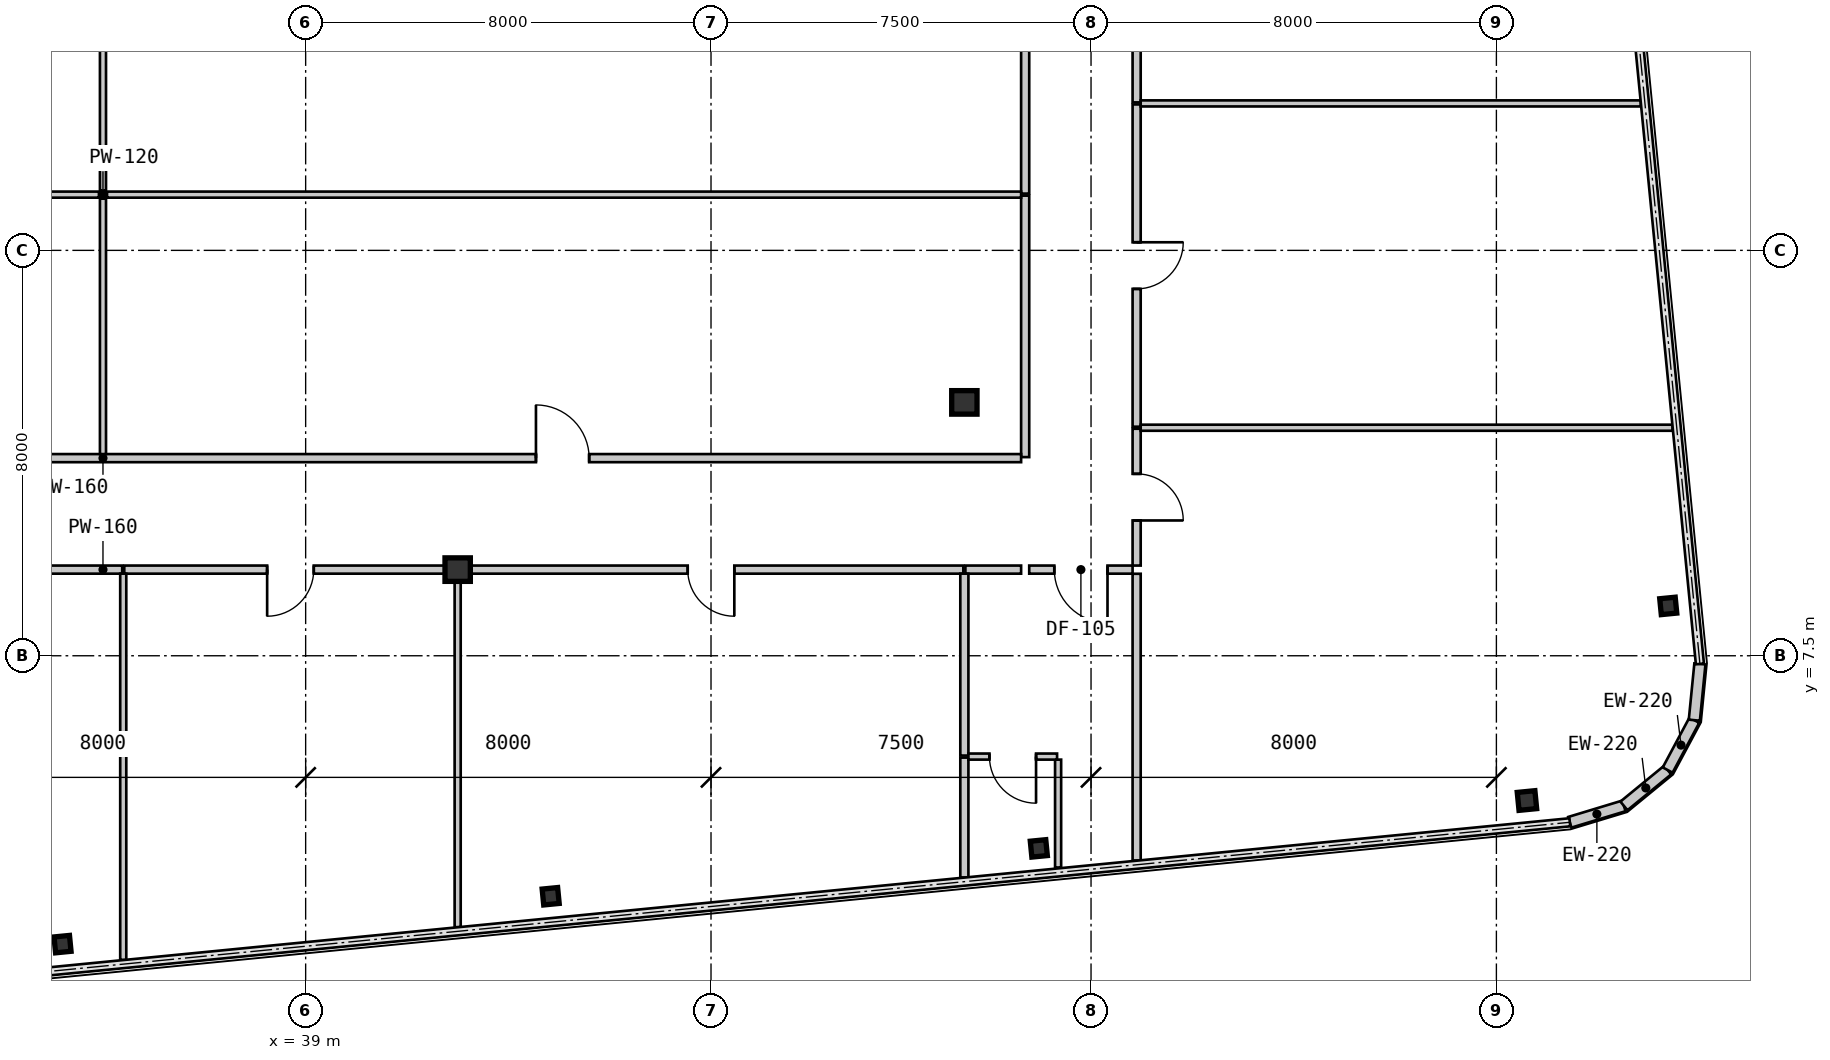
"""IFC4 building model, lengths in metres.
Left out: names, types, materials, properties, quantities, classifications, styles, units other than length and angle.
Written with IfcOpenShell. Run it as: python <this file> out.ifc"""

import sys

from ifc_helpers import new_model, si_unit, direction, frame, frame_2d, origin, origin_2d, place, context, subcontext, project, spatial, rectangle, i_section, extrude, source, transform, mapped, element, fill, save


model = new_model("IFC4")
c1 = context("Model", 3, precision=1e-05, world=origin(), true_north=direction((0.0, 1.0)))
c2 = subcontext(c1, "Body", "Model", "MODEL_VIEW")
j1 = project(units=[si_unit("LENGTHUNIT", "METRE"), si_unit("PLANEANGLEUNIT", "RADIAN")], contexts=[c1])
p1 = place(None, origin())
s1 = spatial("IfcSite", under=j1, at=p1, CompositionType="ELEMENT")
p2 = place(p1, origin())
s2 = spatial("IfcBuilding", under=s1, at=p2, CompositionType="ELEMENT")
p3 = place(p2, frame((0.0, 0.0, 74.55)))
s3 = spatial("IfcBuildingStorey", under=s2, at=p3, CompositionType="ELEMENT", Elevation=74.55)
m1 = source(origin(), c2, "Body", "SweptSolid", [
    extrude(i_section(OverallWidth=0.5, OverallDepth=0.464, WebThickness=0.022, FlangeThickness=0.034, at=origin_2d()), origin(), (0.0, 0.0, 1.0), 3.15),
])
for number, where, z_axis, x_axis in (
    (1, (42.0, 9.2, 0.0), (0.0, 0.0, 1.0), (1.0, 0.0, 0.0)),
    (2, (52.0, 12.5, 0.0), (0.0, 0.0, 1.0), (1.0, 0.0, 0.0)),
):
    element("IfcColumn", number, at=place(p3, frame(where, z_axis=z_axis, x_axis=x_axis)), inside=s3, PredefinedType="COLUMN", context=c2, shape_type="MappedRepresentation", body=[
        mapped(m1, transform((0.0, 0.0, 0.0), scale=1.0)),
    ])
m2 = source(origin(), c2, "Body", "SweptSolid", [
    extrude(i_section(OverallWidth=0.307, OverallDepth=0.315, WebThickness=0.012, FlangeThickness=0.019, at=origin_2d()), origin(), (0.0, 0.0, 1.0), 3.15),
])
for number, where, z_axis, x_axis in (
    (3, (34.202, 1.809, 0.0), (0.0, 0.0, 1.0), (0.995, 0.098, 0.0)),
    (4, (43.835, 2.754, 0.0), (0.0, 0.0, 1.0), (0.995, 0.098, 0.0)),
    (5, (53.469, 3.698, 0.0), (0.0, 0.0, 1.0), (0.995, 0.098, 0.0)),
):
    element("IfcColumn", number, at=place(p3, frame(where, z_axis=z_axis, x_axis=x_axis)), inside=s3, PredefinedType="COLUMN", context=c2, shape_type="MappedRepresentation", body=[
        mapped(m2, transform((0.0, 0.0, 0.0), scale=1.0)),
    ])
m3 = source(origin(), c2, "Body", "SweptSolid", [
    extrude(i_section(OverallWidth=0.35, OverallDepth=0.356, WebThickness=0.018, FlangeThickness=0.028, at=origin_2d()), origin(), (0.0, 0.0, 1.0), 3.15),
])
p4 = place(p3, frame((63.103, 4.643, 0.0), z_axis=(0.0, 0.0, 1.0), x_axis=(0.995227399982, 0.097582899759, 0.0)))
e6 = element("IfcColumn", 6, at=p4, inside=s3, PredefinedType="COLUMN", context=c2, shape_type="MappedRepresentation", body=[
    mapped(m3, transform((0.0, 0.0, 0.0), scale=1.0)),
])
p5 = place(p3, frame((65.892, 8.484, 0.0), z_axis=(0.0, 0.0, 1.0), x_axis=(0.995227399982, 0.097582899759, 0.0)))
e7 = element("IfcColumn", 7, at=p5, inside=s3, PredefinedType="COLUMN", context=c2, shape_type="MappedRepresentation", body=[
    mapped(m2, transform((0.0, 0.0, 0.0), scale=1.0)),
])
m4 = source(origin(), c2, "Body", "SweptSolid", [
    extrude(rectangle(XDim=1.116, YDim=0.22, at=frame_2d((0.558, 0.0))), origin(), (0.0, 0.0, 1.0), 2.93),
])
p6 = place(p3, frame((63.949, 4.214, 0.0), z_axis=(0.0, 0.0, 1.0), x_axis=(0.957052003726, 0.289916301997, 0.0)))
e8 = element("IfcWall", 8, at=p6, inside=s3, PredefinedType="SOLIDWALL", context=c2, shape_type="MappedRepresentation", body=[
    mapped(m4, transform((0.0, 0.0, 0.0), scale=1.0)),
])
m5 = source(origin(), c2, "Body", "SweptSolid", [
    extrude(rectangle(XDim=1.116, YDim=0.22, at=frame_2d((0.558, 0.0))), origin(), (0.0, 0.0, 1.0), 2.93),
])
p7 = place(p3, frame((65.017, 4.537, 0.0), z_axis=(0.0, 0.0, 1.0), x_axis=(0.773342870285, 0.633988016432, 0.0)))
e9 = element("IfcWall", 9, at=p7, inside=s3, PredefinedType="SOLIDWALL", context=c2, shape_type="MappedRepresentation", body=[
    mapped(m5, transform((0.0, 0.0, 0.0), scale=1.0)),
])
p8 = place(p3, frame((65.88, 5.245, 0.0), z_axis=(0.0, 0.0, 1.0), x_axis=(0.471723463201, 0.881746547635, 0.0)))
e10 = element("IfcWall", 10, at=p8, inside=s3, PredefinedType="SOLIDWALL", context=c2, shape_type="MappedRepresentation", body=[
    mapped(m4, transform((0.0, 0.0, 0.0), scale=1.0)),
])
p9 = place(p3, frame((66.406, 6.229, 0.0), z_axis=(0.0, 0.0, 1.0), x_axis=(0.09844234778, 0.995142755671, 0.0)))
e11 = element("IfcWall", 11, at=p9, inside=s3, PredefinedType="SOLIDWALL", context=c2, shape_type="MappedRepresentation", body=[
    mapped(m5, transform((0.0, 0.0, 0.0), scale=1.0)),
])
m6 = source(origin(), c2, "Body", "SweptSolid", [
    extrude(rectangle(XDim=5.16, YDim=0.16, at=frame_2d((2.58, 0.0))), origin(), (0.0, 0.0, 1.0), 2.93),
])
p10 = place(p3, frame((53.2, 11.42, 0.0), z_axis=(0.0, 0.0, 1.0), x_axis=(0.0, 1.0, 0.0)))
e12 = element("IfcWall", 12, at=p10, inside=s3, PredefinedType="PARTITIONING", context=c2, shape_type="MappedRepresentation", body=[
    mapped(m6, transform((0.0, 0.0, 0.0), scale=1.0)),
])
m7 = source(origin(), c2, "Body", "SweptSolid", [
    extrude(rectangle(XDim=5.1, YDim=0.16, at=frame_2d((2.55, 0.0))), origin(), (0.0, 0.0, 1.0), 2.93),
])
p11 = place(p3, frame((53.2, 16.62, 0.0), z_axis=(0.0, 0.0, 1.0), x_axis=(0.0, 1.0, 0.0)))
e13 = element("IfcWall", 13, at=p11, inside=s3, PredefinedType="PARTITIONING", context=c2, shape_type="MappedRepresentation", body=[
    mapped(m7, transform((0.0, 0.0, 0.0), scale=1.0)),
])
m8 = source(origin(), c2, "Body", "SweptSolid", [
    extrude(rectangle(XDim=2.04, YDim=0.16, at=frame_2d((1.02, 0.0))), origin(), (0.0, 0.0, 1.0), 2.93),
])
p12 = place(p3, frame((55.32, 9.2, 0.0), z_axis=(0.0, 0.0, 1.0), x_axis=(-1.0, 0.0, 0.0)))
e14 = element("IfcWall", 14, at=p12, inside=s3, PredefinedType="PARTITIONING", context=c2, shape_type="MappedRepresentation", body=[
    mapped(m8, transform((0.0, 0.0, 0.0), scale=1.0)),
])
m9 = source(origin(), c2, "Body", "SweptSolid", [
    extrude(rectangle(XDim=1.05, YDim=2.1, at=frame_2d((0.525, 1.05))), frame((0.0, 0.09, 0.0), z_axis=(0.0, -1.0, 0.0), x_axis=(1.0, 0.0, 0.0)), (0.0, 0.0, 1.0), 0.18),
])
p13 = place(p12, frame((0.495, 0.0, 0.0)))
e15 = element("IfcOpeningElement", 15, at=p13, cuts=e14, PredefinedType="OPENING", context=c2, shape_type="MappedRepresentation", body=[
    mapped(m9, transform((0.0, 0.0, 0.0), scale=1.0)),
])
m10 = source(origin(), c2, "Body", "SweptSolid", [
    extrude(rectangle(XDim=2.7, YDim=0.16, at=frame_2d((1.35, 0.0))), origin(), (0.0, 0.0, 1.0), 2.93),
])
p14 = place(p3, frame((55.4, 11.98, 0.0), z_axis=(0.0, 0.0, 1.0), x_axis=(0.0, -1.0, 0.0)))
e16 = element("IfcWall", 16, at=p14, inside=s3, PredefinedType="PARTITIONING", context=c2, shape_type="MappedRepresentation", body=[
    mapped(m10, transform((0.0, 0.0, 0.0), scale=1.0)),
])
m11 = source(origin(), c2, "Body", "SweptSolid", [
    extrude(rectangle(XDim=0.92, YDim=2.1, at=frame_2d((0.46, 1.05))), frame((0.0, 0.09, 0.0), z_axis=(0.0, -1.0, 0.0), x_axis=(1.0, 0.0, 0.0)), (0.0, 0.0, 1.0), 0.18),
])
p15 = place(p14, frame((0.89, 0.0, 0.0)))
e17 = element("IfcOpeningElement", 17, at=p15, cuts=e16, PredefinedType="OPENING", context=c2, shape_type="MappedRepresentation", body=[
    mapped(m11, transform((0.0, 0.0, 0.0), scale=1.0)),
])
m12 = source(origin(), c2, "Body", "SweptSolid", [
    extrude(rectangle(XDim=6.36, YDim=0.16, at=frame_2d((3.18, 0.0))), origin(), (0.0, 0.0, 1.0), 2.93),
])
p16 = place(p3, frame((55.4, 18.38, 0.0), z_axis=(0.0, 0.0, 1.0), x_axis=(0.0, -1.0, 0.0)))
e18 = element("IfcWall", 18, at=p16, inside=s3, PredefinedType="PARTITIONING", context=c2, shape_type="MappedRepresentation", body=[
    mapped(m12, transform((0.0, 0.0, 0.0), scale=1.0)),
])
p17 = place(p16, frame((2.72, 0.0, 0.0)))
e19 = element("IfcOpeningElement", 19, at=p17, cuts=e18, PredefinedType="OPENING", context=c2, shape_type="MappedRepresentation", body=[
    mapped(m11, transform((0.0, 0.0, 0.0), scale=1.0)),
])
m13 = source(origin(), c2, "Body", "SweptSolid", [
    extrude(rectangle(XDim=5.5, YDim=0.16, at=frame_2d((2.75, 0.0))), origin(), (0.0, 0.0, 1.0), 2.93),
])
p18 = place(p3, frame((55.4, 23.92, 0.0), z_axis=(0.0, 0.0, 1.0), x_axis=(0.0, -1.0, 0.0)))
e20 = element("IfcWall", 20, at=p18, inside=s3, PredefinedType="PARTITIONING", context=c2, shape_type="MappedRepresentation", body=[
    mapped(m13, transform((0.0, 0.0, 0.0), scale=1.0)),
])
p19 = place(p18, frame((2.29, 0.0, 0.0)))
e21 = element("IfcOpeningElement", 21, at=p19, cuts=e20, PredefinedType="OPENING", context=c2, shape_type="MappedRepresentation", body=[
    mapped(m11, transform((0.0, 0.0, 0.0), scale=1.0)),
])
m14 = source(origin(), c2, "Body", "SweptSolid", [
    extrude(rectangle(XDim=18.1, YDim=0.16, at=frame_2d((9.05, 0.0))), origin(), (0.0, 0.0, 1.0), 2.93),
])
p20 = place(p3, frame((16.88, 11.4, 0.0), z_axis=(0.0, 0.0, 1.0), x_axis=(1.0, 0.0, 0.0)))
e22 = element("IfcWall", 22, at=p20, inside=s3, PredefinedType="PARTITIONING", context=c2, shape_type="MappedRepresentation", body=[
    mapped(m14, transform((0.0, 0.0, 0.0), scale=1.0)),
])
p21 = place(p20, frame((8.525, 0.0, 0.0)))
e23 = element("IfcOpeningElement", 23, at=p21, cuts=e22, PredefinedType="OPENING", context=c2, shape_type="MappedRepresentation", body=[
    mapped(m9, transform((0.0, 0.0, 0.0), scale=1.0)),
])
p22 = place(p3, frame((35.02, 11.4, 0.0), z_axis=(0.0, 0.0, 1.0), x_axis=(1.0, 0.0, 0.0)))
e24 = element("IfcWall", 24, at=p22, inside=s3, PredefinedType="PARTITIONING", context=c2, shape_type="MappedRepresentation", body=[
    mapped(m14, transform((0.0, 0.0, 0.0), scale=1.0)),
])
p23 = place(p22, frame((8.525, 0.0, 0.0)))
e25 = element("IfcOpeningElement", 25, at=p23, cuts=e24, PredefinedType="OPENING", context=c2, shape_type="MappedRepresentation", body=[
    mapped(m9, transform((0.0, 0.0, 0.0), scale=1.0)),
])
m15 = source(origin(), c2, "Body", "SweptSolid", [
    extrude(rectangle(XDim=7.36, YDim=0.16, at=frame_2d((3.68, 0.0))), origin(), (0.0, 0.0, 1.0), 2.328),
])
p24 = place(p3, frame((35.38, 9.2, 0.0), z_axis=(0.0, 0.0, 1.0), x_axis=(-1.0, 0.0, 0.0)))
e26 = element("IfcWall", 26, at=p24, inside=s3, PredefinedType="PARTITIONING", context=c2, shape_type="MappedRepresentation", body=[
    mapped(m15, transform((0.0, 0.0, 0.0), scale=1.0)),
])
p25 = place(p24, frame((3.22, 0.0, 0.0)))
e27 = element("IfcOpeningElement", 27, at=p25, cuts=e26, PredefinedType="OPENING", context=c2, shape_type="MappedRepresentation", body=[
    mapped(m11, transform((0.0, 0.0, 0.0), scale=1.0)),
])
m16 = source(origin(), c2, "Body", "SweptSolid", [
    extrude(rectangle(XDim=6.56, YDim=0.16, at=frame_2d((3.28, 0.0))), origin(), (0.0, 0.0, 1.0), 2.328),
])
p26 = place(p3, frame((41.98, 9.2, 0.0), z_axis=(0.0, 0.0, 1.0), x_axis=(-1.0, 0.0, 0.0)))
e28 = element("IfcWall", 28, at=p26, inside=s3, PredefinedType="PARTITIONING", context=c2, shape_type="MappedRepresentation", body=[
    mapped(m16, transform((0.0, 0.0, 0.0), scale=1.0)),
])
p27 = place(p26, frame((2.82, 0.0, 0.0)))
e29 = element("IfcOpeningElement", 29, at=p27, cuts=e28, PredefinedType="OPENING", context=c2, shape_type="MappedRepresentation", body=[
    mapped(m11, transform((0.0, 0.0, 0.0), scale=1.0)),
])
m17 = source(origin(), c2, "Body", "SweptSolid", [
    extrude(rectangle(XDim=9.959, YDim=0.16, at=frame_2d((4.98, 0.0))), origin(), (0.0, 0.0, 1.0), 2.93),
])
p28 = place(p3, frame((51.98, 9.2, 0.0), z_axis=(0.0, 0.0, 1.0), x_axis=(-1.0, 0.0, 0.0)))
e30 = element("IfcWall", 30, at=p28, inside=s3, PredefinedType="PARTITIONING", context=c2, shape_type="MappedRepresentation", body=[
    mapped(m17, transform((0.0, 0.0, 0.0), scale=1.0)),
])
p29 = place(p28, frame((4.52, 0.0, 0.0)))
e31 = element("IfcOpeningElement", 31, at=p29, cuts=e30, PredefinedType="OPENING", context=c2, shape_type="MappedRepresentation", body=[
    mapped(m11, transform((0.0, 0.0, 0.0), scale=1.0)),
])
m18 = source(origin(), c2, "Body", "SweptSolid", [
    extrude(rectangle(XDim=1.1, YDim=0.16, at=frame_2d((0.55, 0.0))), origin(), (0.0, 0.0, 1.0), 2.93),
])
p30 = place(p3, frame((53.12, 9.2, 0.0), z_axis=(0.0, 0.0, 1.0), x_axis=(-1.0, 0.0, 0.0)))
e32 = element("IfcWall", 32, at=p30, inside=s3, PredefinedType="PARTITIONING", context=c2, shape_type="MappedRepresentation", body=[
    mapped(m18, transform((0.0, 0.0, 0.0), scale=1.0)),
])
m19 = source(origin(), c2, "Body", "SweptSolid", [
    extrude(rectangle(XDim=18.04, YDim=0.12, at=frame_2d((9.02, 0.0))), origin(), (0.0, 0.0, 1.0), 2.93),
])
p31 = place(p3, frame((16.88, 16.6, 0.0), z_axis=(0.0, 0.0, 1.0), x_axis=(1.0, 0.0, 0.0)))
e33 = element("IfcWall", 33, at=p31, inside=s3, PredefinedType="PARTITIONING", context=c2, shape_type="MappedRepresentation", body=[
    mapped(m19, transform((0.0, 0.0, 0.0), scale=1.0)),
])
m20 = source(origin(), c2, "Body", "SweptSolid", [
    extrude(rectangle(XDim=5.04, YDim=0.12, at=frame_2d((2.52, 0.0))), origin(), (0.0, 0.0, 1.0), 2.93),
])
for number, where, z_axis, x_axis in (
    (34, (35.0, 16.52, 0.0), (0.0, 0.0, 1.0), (0.0, -1.0, 0.0)),
    (35, (35.0, 21.72, 0.0), (0.0, 0.0, 1.0), (0.0, -1.0, 0.0)),
):
    element("IfcWall", number, at=place(p3, frame(where, z_axis=z_axis, x_axis=x_axis)), inside=s3, PredefinedType="PARTITIONING", context=c2, shape_type="MappedRepresentation", body=[
        mapped(m20, transform((0.0, 0.0, 0.0), scale=1.0)),
    ])
p32 = place(p3, frame((35.08, 16.6, 0.0), z_axis=(0.0, 0.0, 1.0), x_axis=(1.0, 0.0, 0.0)))
e36 = element("IfcWall", 36, at=p32, inside=s3, PredefinedType="PARTITIONING", context=c2, shape_type="MappedRepresentation", body=[
    mapped(m19, transform((0.0, 0.0, 0.0), scale=1.0)),
])
m21 = source(origin(), c2, "Body", "SweptSolid", [
    extrude(rectangle(XDim=7.623, YDim=0.12, at=frame_2d((3.812, 0.0))), origin(), (0.0, 0.0, 1.0), 2.93),
])
p33 = place(p3, frame((35.4, 9.12, 0.0), z_axis=(0.0, 0.0, 1.0), x_axis=(0.0, -1.0, 0.0)))
e37 = element("IfcWall", 37, at=p33, inside=s3, PredefinedType="PARTITIONING", context=c2, shape_type="MappedRepresentation", body=[
    mapped(m21, transform((0.0, 0.0, 0.0), scale=1.0)),
])
m22 = source(origin(), c2, "Body", "SweptSolid", [
    extrude(rectangle(XDim=6.976, YDim=0.12, at=frame_2d((3.488, 0.0))), origin(), (0.0, 0.0, 1.0), 2.93),
])
p34 = place(p3, frame((42.0, 9.12, 0.0), z_axis=(0.0, 0.0, 1.0), x_axis=(0.0, -1.0, 0.0)))
e38 = element("IfcWall", 38, at=p34, inside=s3, PredefinedType="PARTITIONING", context=c2, shape_type="MappedRepresentation", body=[
    mapped(m22, transform((0.0, 0.0, 0.0), scale=1.0)),
])
m23 = source(origin(), c2, "Body", "SweptSolid", [
    extrude(rectangle(XDim=3.59, YDim=0.16, at=frame_2d((1.795, 0.0))), origin(), (0.0, 0.0, 1.0), 2.93),
])
p35 = place(p3, frame((52.0, 9.12, 0.0), z_axis=(0.0, 0.0, 1.0), x_axis=(0.0, -1.0, 0.0)))
e39 = element("IfcWall", 39, at=p35, inside=s3, PredefinedType="PARTITIONING", context=c2, shape_type="MappedRepresentation", body=[
    mapped(m23, transform((0.0, 0.0, 0.0), scale=1.0)),
])
m24 = source(origin(), c2, "Body", "SweptSolid", [
    extrude(rectangle(XDim=2.365, YDim=0.16, at=frame_2d((1.183, 0.0))), origin(), (0.0, 0.0, 1.0), 2.93),
])
p36 = place(p3, frame((52.0, 5.49, 0.0), z_axis=(0.0, 0.0, 1.0), x_axis=(0.0, -1.0, 0.0)))
e40 = element("IfcWall", 40, at=p36, inside=s3, PredefinedType="PARTITIONING", context=c2, shape_type="MappedRepresentation", body=[
    mapped(m24, transform((0.0, 0.0, 0.0), scale=1.0)),
])
m25 = source(origin(), c2, "Body", "SweptSolid", [
    extrude(rectangle(XDim=2.128, YDim=0.12, at=frame_2d((1.064, 0.0))), origin(), (0.0, 0.0, 1.0), 2.93),
])
p37 = place(p3, frame((53.85, 3.322, 0.0), z_axis=(0.0, 0.0, 1.0), x_axis=(0.0, 1.0, 0.0)))
e41 = element("IfcWall", 41, at=p37, inside=s3, PredefinedType="PARTITIONING", context=c2, shape_type="MappedRepresentation", body=[
    mapped(m25, transform((0.0, 0.0, 0.0), scale=1.0)),
])
m26 = source(origin(), c2, "Body", "SweptSolid", [
    extrude(rectangle(XDim=1.75, YDim=0.12, at=frame_2d((0.875, 0.0))), origin(), (0.0, 0.0, 1.0), 2.93),
])
p38 = place(p3, frame((53.83, 5.51, 0.0), z_axis=(0.0, 0.0, 1.0), x_axis=(-1.0, 0.0, 0.0)))
e42 = element("IfcWall", 42, at=p38, inside=s3, PredefinedType="PARTITIONING", context=c2, shape_type="MappedRepresentation", body=[
    mapped(m26, transform((0.0, 0.0, 0.0), scale=1.0)),
])
m27 = source(origin(), c2, "Body", "SweptSolid", [
    extrude(rectangle(XDim=0.92, YDim=2.1, at=frame_2d((0.46, 1.05))), frame((0.0, 0.07, 0.0), z_axis=(0.0, -1.0, 0.0), x_axis=(1.0, 0.0, 0.0)), (0.0, 0.0, 1.0), 0.14),
])
p39 = place(p38, frame((0.415, 0.0, 0.0)))
e43 = element("IfcOpeningElement", 43, at=p39, cuts=e42, PredefinedType="OPENING", context=c2, shape_type="MappedRepresentation", body=[
    mapped(m27, transform((0.0, 0.0, 0.0), scale=1.0)),
])
m28 = source(origin(), c2, "Body", "SweptSolid", [
    extrude(rectangle(XDim=5.658, YDim=0.16, at=frame_2d((2.829, 0.0))), origin(), (0.0, 0.0, 1.0), 2.93),
])
p40 = place(p3, frame((55.4, 9.118, 0.0), z_axis=(0.0, 0.0, 1.0), x_axis=(0.0, -1.0, 0.0)))
e44 = element("IfcWall", 44, at=p40, inside=s3, PredefinedType="PARTITIONING", context=c2, shape_type="MappedRepresentation", body=[
    mapped(m28, transform((0.0, 0.0, 0.0), scale=1.0)),
])
m29 = source(origin(), c2, "Body", "SweptSolid", [
    extrude(rectangle(XDim=10.497, YDim=0.12, at=frame_2d((5.249, 0.0))), origin(), (0.0, 0.0, 1.0), 2.93),
])
p41 = place(p3, frame((55.48, 12.0, 0.0), z_axis=(0.0, 0.0, 1.0), x_axis=(1.0, 0.0, 0.0)))
e45 = element("IfcWall", 45, at=p41, inside=s3, PredefinedType="PARTITIONING", context=c2, shape_type="MappedRepresentation", body=[
    mapped(m29, transform((0.0, 0.0, 0.0), scale=1.0)),
])
m30 = source(origin(), c2, "Body", "SweptSolid", [
    extrude(rectangle(XDim=9.869, YDim=0.12, at=frame_2d((4.935, 0.0))), origin(), (0.0, 0.0, 1.0), 2.93),
])
p42 = place(p3, frame((55.48, 18.4, 0.0), z_axis=(0.0, 0.0, 1.0), x_axis=(1.0, 0.0, 0.0)))
e46 = element("IfcWall", 46, at=p42, inside=s3, PredefinedType="PARTITIONING", context=c2, shape_type="MappedRepresentation", body=[
    mapped(m30, transform((0.0, 0.0, 0.0), scale=1.0)),
])
m31 = source(origin(), c2, "Body", "SweptSolid", [
    extrude(rectangle(XDim=1.05, YDim=2.1, at=frame_2d((0.525, 1.05))), frame((0.0, 0.025, 0.0), z_axis=(0.0, -1.0, 0.0), x_axis=(1.0, 0.0, 0.0)), (0.0, 0.0, 1.0), 0.05),
])
p43 = place(p13, origin())
e47 = element("IfcDoor", 47, at=p43, inside=s3, OperationType="SINGLE_SWING_LEFT", PredefinedType="DOOR", context=c2, shape_type="MappedRepresentation", body=[
    mapped(m31, transform((0.0, 0.0, 0.0), scale=1.0)),
])
fill(e15, e47)
m32 = source(origin(), c2, "Body", "SweptSolid", [
    extrude(rectangle(XDim=0.92, YDim=2.1, at=frame_2d((0.46, 1.05))), frame((0.0, 0.025, 0.0), z_axis=(0.0, -1.0, 0.0), x_axis=(1.0, 0.0, 0.0)), (0.0, 0.0, 1.0), 0.05),
])
p44 = place(p15, origin())
e48 = element("IfcDoor", 48, at=p44, inside=s3, OperationType="SINGLE_SWING_RIGHT", PredefinedType="DOOR", context=c2, shape_type="MappedRepresentation", body=[
    mapped(m32, transform((0.0, 0.0, 0.0), scale=1.0)),
])
fill(e17, e48)
p45 = place(p17, origin())
e49 = element("IfcDoor", 49, at=p45, inside=s3, OperationType="SINGLE_SWING_LEFT", PredefinedType="DOOR", context=c2, shape_type="MappedRepresentation", body=[
    mapped(m32, transform((0.0, 0.0, 0.0), scale=1.0)),
])
fill(e19, e49)
p46 = place(p23, origin())
e50 = element("IfcDoor", 50, at=p46, inside=s3, OperationType="SINGLE_SWING_LEFT", PredefinedType="DOOR", context=c2, shape_type="MappedRepresentation", body=[
    mapped(m31, transform((0.0, 0.0, 0.0), scale=1.0)),
])
fill(e25, e50)
p47 = place(p27, origin())
e51 = element("IfcDoor", 51, at=p47, inside=s3, OperationType="SINGLE_SWING_RIGHT", PredefinedType="DOOR", context=c2, shape_type="MappedRepresentation", body=[
    mapped(m32, transform((0.0, 0.0, 0.0), scale=1.0)),
])
fill(e29, e51)
p48 = place(p29, origin())
e52 = element("IfcDoor", 52, at=p48, inside=s3, OperationType="SINGLE_SWING_LEFT", PredefinedType="DOOR", context=c2, shape_type="MappedRepresentation", body=[
    mapped(m32, transform((0.0, 0.0, 0.0), scale=1.0)),
])
fill(e31, e52)
p49 = place(p39, origin())
e53 = element("IfcDoor", 53, at=p49, inside=s3, OperationType="SINGLE_SWING_LEFT", PredefinedType="DOOR", context=c2, shape_type="MappedRepresentation", body=[
    mapped(m32, transform((0.0, 0.0, 0.0), scale=1.0)),
])
fill(e43, e53)
save(model, sys.argv[1])
